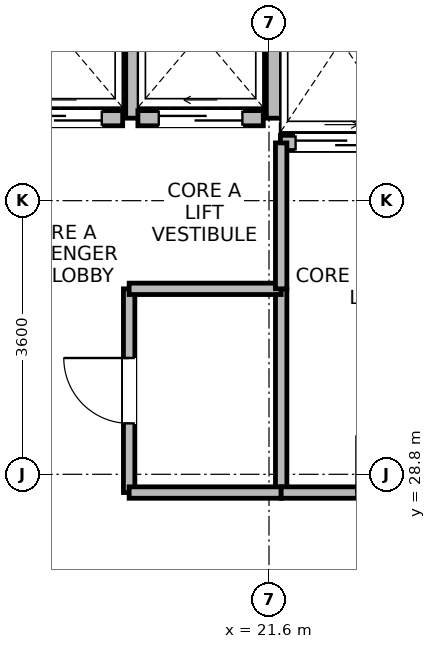
"""IFC4 building model, lengths in metres.
Left out: names, types, materials, properties, quantities, classifications, styles, units other than length and angle.
Written with IfcOpenShell. Run it as: python <this file> out.ifc"""

import sys

from ifc_helpers import new_model, si_unit, direction, frame, frame_2d, origin, place, context, subcontext, project, spatial, rectangle, extrude, element, fill, save


model = new_model("IFC4")
c1 = context("Model", 3, precision=1e-05, world=origin(), true_north=direction((0.0, 1.0)))
c2 = subcontext(c1, "Body", "Model", "MODEL_VIEW")
j1 = project(units=[si_unit("LENGTHUNIT", "METRE"), si_unit("PLANEANGLEUNIT", "RADIAN")], contexts=[c1])
p1 = place(None, origin())
s1 = spatial("IfcSite", under=j1, at=p1, CompositionType="ELEMENT")
p2 = place(p1, origin())
s2 = spatial("IfcBuilding", under=s1, at=p2, CompositionType="ELEMENT")
p3 = place(p2, frame((0.0, 0.0, 36.4)))
s3 = spatial("IfcBuildingStorey", under=s2, at=p3, CompositionType="ELEMENT", Elevation=36.4)
p4 = place(p3, frame((18.025, 33.485, 0.0), z_axis=(0.0, 0.0, 1.0), x_axis=(1.0, 0.0, 0.0)))
e1 = element("IfcWall", 1, at=p4, inside=s3, PredefinedType="PARTITIONING", context=c2, shape_type="SweptSolid", body=[
    extrude(rectangle(XDim=1.65, YDim=0.2, at=frame_2d((0.825, 0.0))), origin(), (0.0, 0.0, 1.0), 3.43),
])
p5 = place(p4, frame((0.275, 0.0, 0.0)))
e2 = element("IfcOpeningElement", 2, at=p5, cuts=e1, PredefinedType="OPENING", context=c2, shape_type="SweptSolid", body=[
    extrude(rectangle(XDim=1.1, YDim=2.12, at=frame_2d((0.55, 1.06))), frame((0.0, 0.11, 0.0), z_axis=(0.0, -1.0, 0.0), x_axis=(1.0, 0.0, 0.0)), (0.0, 0.0, 1.0), 0.22),
])
p6 = place(p3, frame((19.815, 33.485, 0.0), z_axis=(0.0, 0.0, 1.0), x_axis=(0.0, 1.0, 0.0)))
e3 = element("IfcWall", 3, at=p6, inside=s3, PredefinedType="PARTITIONING", context=c2, shape_type="SweptSolid", body=[
    extrude(rectangle(XDim=2.23, YDim=0.2, at=frame_2d((1.115, 0.0))), origin(), (0.0, 0.0, 1.0), 3.43),
])
p7 = place(p3, frame((19.875, 33.485, 0.0), z_axis=(0.0, 0.0, 1.0), x_axis=(1.0, 0.0, 0.0)))
e4 = element("IfcWall", 4, at=p7, inside=s3, PredefinedType="PARTITIONING", context=c2, shape_type="SweptSolid", body=[
    extrude(rectangle(XDim=1.65, YDim=0.2, at=frame_2d((0.825, 0.0))), origin(), (0.0, 0.0, 1.0), 3.43),
])
p8 = place(p7, frame((0.275, 0.0, 0.0)))
e5 = element("IfcOpeningElement", 5, at=p8, cuts=e4, PredefinedType="OPENING", context=c2, shape_type="SweptSolid", body=[
    extrude(rectangle(XDim=1.1, YDim=2.12, at=frame_2d((0.55, 1.06))), frame((0.0, 0.11, 0.0), z_axis=(0.0, -1.0, 0.0), x_axis=(1.0, 0.0, 0.0)), (0.0, 0.0, 1.0), 0.22),
])
p9 = place(p3, frame((21.665, 33.485, 0.0), z_axis=(0.0, 0.0, 1.0), x_axis=(0.0, 1.0, 0.0)))
e6 = element("IfcWall", 6, at=p9, inside=s3, PredefinedType="PARTITIONING", context=c2, shape_type="SweptSolid", body=[
    extrude(rectangle(XDim=2.23, YDim=0.2, at=frame_2d((1.115, 0.0))), origin(), (0.0, 0.0, 1.0), 3.43),
])
p10 = place(p3, frame((21.75, 33.16, 0.0), z_axis=(0.0, 0.0, 1.0), x_axis=(1.0, 0.0, 0.0)))
e7 = element("IfcWall", 7, at=p10, inside=s3, PredefinedType="PARTITIONING", context=c2, shape_type="SweptSolid", body=[
    extrude(rectangle(XDim=1.6, YDim=0.2, at=frame_2d((0.8, 0.0))), origin(), (0.0, 0.0, 1.0), 3.43),
])
p11 = place(p10, frame((0.2, 0.0, 0.0)))
e8 = element("IfcOpeningElement", 8, at=p11, cuts=e7, PredefinedType="OPENING", context=c2, shape_type="SweptSolid", body=[
    extrude(rectangle(XDim=1.2, YDim=2.12, at=frame_2d((0.6, 1.06))), frame((0.0, 0.11, 0.0), z_axis=(0.0, -1.0, 0.0), x_axis=(1.0, 0.0, 0.0)), (0.0, 0.0, 1.0), 0.22),
])
p12 = place(p3, frame((19.76, 28.56, 0.0), z_axis=(0.0, 0.0, 1.0), x_axis=(0.0, 1.0, 0.0)))
e9 = element("IfcWall", 9, at=p12, inside=s3, PredefinedType="PARTITIONING", context=c2, shape_type="SweptSolid", body=[
    extrude(rectangle(XDim=2.68, YDim=0.15, at=frame_2d((1.34, 0.0))), origin(), (0.0, 0.0, 1.0), 3.43),
])
p13 = place(p12, frame((0.91, 0.0, 0.0)))
e10 = element("IfcOpeningElement", 10, at=p13, cuts=e9, PredefinedType="OPENING", context=c2, shape_type="SweptSolid", body=[
    extrude(rectangle(XDim=0.86, YDim=2.02, at=frame_2d((0.43, 1.01))), frame((0.0, 0.085, 0.0), z_axis=(0.0, -1.0, 0.0), x_axis=(1.0, 0.0, 0.0)), (0.0, 0.0, 1.0), 0.17),
])
p14 = place(p3, frame((21.76, 28.56, 0.0), z_axis=(0.0, 0.0, 1.0), x_axis=(0.0, 1.0, 0.0)))
e11 = element("IfcWall", 11, at=p14, inside=s3, PredefinedType="PARTITIONING", context=c2, shape_type="SweptSolid", body=[
    extrude(rectangle(XDim=2.68, YDim=0.15, at=frame_2d((1.34, 0.0))), origin(), (0.0, 0.0, 1.0), 3.43),
])
p15 = place(p3, frame((19.76, 28.56, 0.0), z_axis=(0.0, 0.0, 1.0), x_axis=(1.0, 0.0, 0.0)))
e12 = element("IfcWall", 12, at=p15, inside=s3, PredefinedType="PARTITIONING", context=c2, shape_type="SweptSolid", body=[
    extrude(rectangle(XDim=2.0, YDim=0.15, at=frame_2d((1.0, 0.0))), origin(), (0.0, 0.0, 1.0), 2.23),
])
p16 = place(p3, frame((19.76, 31.24, 0.0), z_axis=(0.0, 0.0, 1.0), x_axis=(1.0, 0.0, 0.0)))
e13 = element("IfcWall", 13, at=p16, inside=s3, PredefinedType="PARTITIONING", context=c2, shape_type="SweptSolid", body=[
    extrude(rectangle(XDim=2.0, YDim=0.15, at=frame_2d((1.0, 0.0))), origin(), (0.0, 0.0, 1.0), 3.43),
])
p17 = place(p3, frame((21.76, 28.56, 0.0), z_axis=(0.0, 0.0, 1.0), x_axis=(1.0, 0.0, 0.0)))
e14 = element("IfcWall", 14, at=p17, inside=s3, PredefinedType="PARTITIONING", context=c2, shape_type="SweptSolid", body=[
    extrude(rectangle(XDim=3.48, YDim=0.15, at=frame_2d((1.74, 0.0))), origin(), (0.0, 0.0, 1.0), 2.23),
])
p18 = place(p17, frame((0.99, 0.0, 0.0)))
e15 = element("IfcOpeningElement", 15, at=p18, cuts=e14, PredefinedType="OPENING", context=c2, shape_type="SweptSolid", body=[
    extrude(rectangle(XDim=1.5, YDim=2.1, at=frame_2d((0.75, 1.05))), frame((0.0, 0.085, 0.0), z_axis=(0.0, -1.0, 0.0), x_axis=(1.0, 0.0, 0.0)), (0.0, 0.0, 1.0), 0.17),
])
p19 = place(p3, frame((21.76, 31.24, 0.0), z_axis=(0.0, 0.0, 1.0), x_axis=(0.0, 1.0, 0.0)))
e16 = element("IfcWall", 16, at=p19, inside=s3, PredefinedType="PARTITIONING", context=c2, shape_type="SweptSolid", body=[
    extrude(rectangle(XDim=1.92, YDim=0.15, at=frame_2d((0.96, 0.0))), origin(), (0.0, 0.0, 1.0), 3.43),
])
p20 = place(p5, origin())
e17 = element("IfcDoor", 17, at=p20, inside=s3, OperationType="SLIDING_TO_LEFT", PredefinedType="DOOR", context=c2, shape_type="SweptSolid", body=[
    extrude(rectangle(XDim=1.1, YDim=2.12, at=frame_2d((0.55, 1.06))), frame((0.0, 0.025, 0.0), z_axis=(0.0, -1.0, 0.0), x_axis=(1.0, 0.0, 0.0)), (0.0, 0.0, 1.0), 0.05),
])
fill(e2, e17)
p21 = place(p8, origin())
e18 = element("IfcDoor", 18, at=p21, inside=s3, OperationType="SLIDING_TO_LEFT", PredefinedType="DOOR", context=c2, shape_type="SweptSolid", body=[
    extrude(rectangle(XDim=1.1, YDim=2.12, at=frame_2d((0.55, 1.06))), frame((0.0, 0.025, 0.0), z_axis=(0.0, -1.0, 0.0), x_axis=(1.0, 0.0, 0.0)), (0.0, 0.0, 1.0), 0.05),
])
fill(e5, e18)
p22 = place(p11, origin())
e19 = element("IfcDoor", 19, at=p22, inside=s3, OperationType="SLIDING_TO_RIGHT", PredefinedType="DOOR", context=c2, shape_type="SweptSolid", body=[
    extrude(rectangle(XDim=1.2, YDim=2.12, at=frame_2d((0.6, 1.06))), frame((0.0, 0.025, 0.0), z_axis=(0.0, -1.0, 0.0), x_axis=(1.0, 0.0, 0.0)), (0.0, 0.0, 1.0), 0.05),
])
fill(e8, e19)
p23 = place(p13, origin())
e20 = element("IfcDoor", 20, at=p23, inside=s3, OperationType="SINGLE_SWING_RIGHT", PredefinedType="DOOR", context=c2, shape_type="SweptSolid", body=[
    extrude(rectangle(XDim=0.86, YDim=2.02, at=frame_2d((0.43, 1.01))), frame((0.0, 0.025, 0.0), z_axis=(0.0, -1.0, 0.0), x_axis=(1.0, 0.0, 0.0)), (0.0, 0.0, 1.0), 0.05),
])
fill(e10, e20)
save(model, sys.argv[1])
